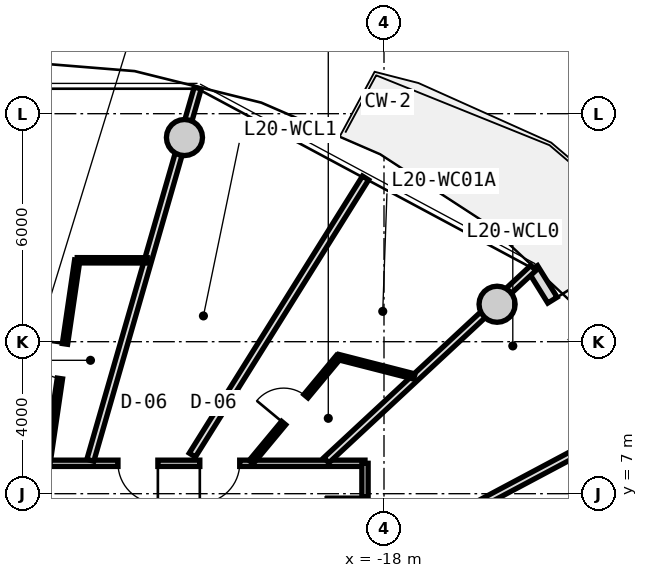
"""IFC4 building model, lengths in metres.
Left out: names, types, materials, properties, quantities, classifications, styles, units other than length and angle.
Written with IfcOpenShell. Run it as: python <this file> out.ifc"""

import sys

from ifc_helpers import new_model, si_unit, direction, frame, frame_2d, origin, origin_2d, place, context, subcontext, project, spatial, rectangle, circle, extrude, source, transform, mapped, element, fill, save


model = new_model("IFC4")
c1 = context("Model", 3, precision=1e-05, world=origin(), true_north=direction((0.0, 1.0)))
c2 = subcontext(c1, "Body", "Model", "MODEL_VIEW")
j1 = project(units=[si_unit("LENGTHUNIT", "METRE"), si_unit("PLANEANGLEUNIT", "RADIAN")], contexts=[c1])
p1 = place(None, origin())
s1 = spatial("IfcSite", under=j1, at=p1, CompositionType="ELEMENT")
p2 = place(p1, origin())
s2 = spatial("IfcBuilding", under=s1, at=p2, CompositionType="ELEMENT")
p3 = place(p2, frame((0.0, 0.0, 67.35)))
s3 = spatial("IfcBuildingStorey", under=s2, at=p3, CompositionType="ELEMENT", Elevation=67.35)
m1 = source(origin(), c2, "Body", "SweptSolid", [
    extrude(circle(Radius=0.475, at=origin_2d()), origin(), (0.0, 0.0, 1.0), 3.05),
])
for number, where, z_axis, x_axis in (
    (1, (-15.025, 11.985, 0.0), (0.0, 0.0, 1.0), (1.0, 0.0, 0.0)),
    (2, (-23.251, 16.373, 0.0), (0.0, 0.0, 1.0), (1.0, 0.0, 0.0)),
):
    element("IfcColumn", number, at=place(p3, frame(where, z_axis=z_axis, x_axis=x_axis)), inside=s3, PredefinedType="COLUMN", context=c2, shape_type="MappedRepresentation", body=[
        mapped(m1, transform((0.0, 0.0, 0.0), x_axis=(1.0, 0.0, 0.0), y_axis=(0.0, 1.0, 0.0), z_axis=(0.0, 0.0, 1.0), scale=1.0)),
    ])
m2 = source(origin(), c2, "Body", "SweptSolid", [
    extrude(rectangle(XDim=9.649, YDim=0.29, at=frame_2d((4.824, 0.0))), origin(), (0.0, 0.0, 1.0), 2.79),
])
p4 = place(p3, frame((-14.084, 12.926, 0.0), z_axis=(0.0, 0.0, 1.0), x_axis=(0.527909458386, -0.849300655684, 0.0)))
e3 = element("IfcWall", 3, at=p4, inside=s3, PredefinedType="SOLIDWALL", context=c2, shape_type="MappedRepresentation", body=[
    mapped(m2, transform((0.0, 0.0, 0.0), x_axis=(1.0, 0.0, 0.0), y_axis=(0.0, 1.0, 0.0), z_axis=(0.0, 0.0, 1.0), scale=1.0)),
])
p5 = place(p4, frame((0.98, 0.0, 0.0)))
e4 = element("IfcOpeningElement", 4, at=p5, cuts=e3, PredefinedType="OPENING", context=c2, shape_type="SweptSolid", body=[
    extrude(rectangle(XDim=1.15, YDim=2.25, at=frame_2d((0.575, 1.125))), frame((0.0, 0.155, 0.0), z_axis=(0.0, -1.0, 0.0), x_axis=(1.0, 0.0, 0.0)), (0.0, 0.0, 1.0), 0.31),
])
p6 = place(p4, frame((5.354, 0.0, 0.85)))
e5 = element("IfcOpeningElement", 5, at=p6, cuts=e3, PredefinedType="OPENING", context=c2, shape_type="SweptSolid", body=[
    extrude(rectangle(XDim=1.2, YDim=1.5, at=frame_2d((0.6, 0.75))), frame((0.0, 0.155, 0.0), z_axis=(0.0, -1.0, 0.0), x_axis=(1.0, 0.0, 0.0)), (0.0, 0.0, 1.0), 0.31),
])
m3 = source(origin(), c2, "Body", "SweptSolid", [
    extrude(rectangle(XDim=19.0, YDim=0.165, at=frame_2d((9.5, 0.0))), origin(), (0.0, 0.0, 1.0), 2.775),
])
p7 = place(p3, frame((-37.5, 7.8, 0.0), z_axis=(0.0, 0.0, 1.0), x_axis=(1.0, 0.0, 0.0)))
e6 = element("IfcWall", 6, at=p7, inside=s3, PredefinedType="PARTITIONING", context=c2, shape_type="MappedRepresentation", body=[
    mapped(m3, transform((0.0, 0.0, 0.0), x_axis=(1.0, 0.0, 0.0), y_axis=(0.0, 1.0, 0.0), z_axis=(0.0, 0.0, 1.0), scale=1.0)),
])
p8 = place(p7, frame((14.653, 0.0, 0.0)))
e7 = element("IfcOpeningElement", 7, at=p8, cuts=e6, PredefinedType="OPENING", context=c2, shape_type="SweptSolid", body=[
    extrude(rectangle(XDim=1.05, YDim=2.15, at=frame_2d((0.525, 1.075))), frame((0.0, 0.093, 0.0), z_axis=(0.0, -1.0, 0.0), x_axis=(1.0, 0.0, 0.0)), (0.0, 0.0, 1.0), 0.185),
])
p9 = place(p7, frame((12.5, 0.0, 0.0)))
e8 = element("IfcOpeningElement", 8, at=p9, cuts=e6, PredefinedType="OPENING", context=c2, shape_type="SweptSolid", body=[
    extrude(rectangle(XDim=1.05, YDim=2.15, at=frame_2d((0.525, 1.075))), frame((0.0, 0.093, 0.0), z_axis=(0.0, -1.0, 0.0), x_axis=(1.0, 0.0, 0.0)), (0.0, 0.0, 1.0), 0.185),
])
p10 = place(p7, frame((9.352, 0.0, 0.0)))
e9 = element("IfcOpeningElement", 9, at=p10, cuts=e6, PredefinedType="OPENING", context=c2, shape_type="SweptSolid", body=[
    extrude(rectangle(XDim=1.05, YDim=2.15, at=frame_2d((0.525, 1.075))), frame((0.0, 0.093, 0.0), z_axis=(0.0, -1.0, 0.0), x_axis=(1.0, 0.0, 0.0)), (0.0, 0.0, 1.0), 0.185),
])
p11 = place(p7, frame((7.806, 0.0, 0.0)))
e10 = element("IfcOpeningElement", 10, at=p11, cuts=e6, PredefinedType="OPENING", context=c2, shape_type="SweptSolid", body=[
    extrude(rectangle(XDim=1.05, YDim=2.15, at=frame_2d((0.525, 1.075))), frame((0.0, 0.093, 0.0), z_axis=(0.0, -1.0, 0.0), x_axis=(1.0, 0.0, 0.0)), (0.0, 0.0, 1.0), 0.185),
])
p12 = place(p7, frame((4.773, 0.0, 0.0)))
e11 = element("IfcOpeningElement", 11, at=p12, cuts=e6, PredefinedType="OPENING", context=c2, shape_type="SweptSolid", body=[
    extrude(rectangle(XDim=1.05, YDim=2.15, at=frame_2d((0.525, 1.075))), frame((0.0, 0.093, 0.0), z_axis=(0.0, -1.0, 0.0), x_axis=(1.0, 0.0, 0.0)), (0.0, 0.0, 1.0), 0.185),
])
p13 = place(p7, frame((2.251, 0.0, 0.0)))
e12 = element("IfcOpeningElement", 12, at=p13, cuts=e6, PredefinedType="OPENING", context=c2, shape_type="SweptSolid", body=[
    extrude(rectangle(XDim=1.05, YDim=2.15, at=frame_2d((0.525, 1.075))), frame((0.0, 0.093, 0.0), z_axis=(0.0, -1.0, 0.0), x_axis=(1.0, 0.0, 0.0)), (0.0, 0.0, 1.0), 0.185),
])
m4 = source(origin(), c2, "Body", "SweptSolid", [
    extrude(rectangle(XDim=15.6, YDim=0.165, at=frame_2d((7.8, 0.0))), origin(), (0.0, 0.0, 1.0), 2.775),
])
p14 = place(p3, frame((-18.5, 7.8, 0.0), z_axis=(0.0, 0.0, 1.0), x_axis=(0.0, -1.0, 0.0)))
e13 = element("IfcWall", 13, at=p14, inside=s3, PredefinedType="PARTITIONING", context=c2, shape_type="MappedRepresentation", body=[
    mapped(m4, transform((0.0, 0.0, 0.0), x_axis=(1.0, 0.0, 0.0), y_axis=(0.0, 1.0, 0.0), z_axis=(0.0, 0.0, 1.0), scale=1.0)),
])
p15 = place(p14, frame((12.141, 0.0, 0.0)))
e14 = element("IfcOpeningElement", 14, at=p15, cuts=e13, PredefinedType="OPENING", context=c2, shape_type="SweptSolid", body=[
    extrude(rectangle(XDim=1.25, YDim=2.2, at=frame_2d((0.625, 1.1))), frame((0.0, 0.093, 0.0), z_axis=(0.0, -1.0, 0.0), x_axis=(1.0, 0.0, 0.0)), (0.0, 0.0, 1.0), 0.185),
])
p16 = place(p14, frame((7.175, 0.0, 0.0)))
e15 = element("IfcOpeningElement", 15, at=p16, cuts=e13, PredefinedType="OPENING", context=c2, shape_type="SweptSolid", body=[
    extrude(rectangle(XDim=1.25, YDim=2.2, at=frame_2d((0.625, 1.1))), frame((0.0, 0.093, 0.0), z_axis=(0.0, -1.0, 0.0), x_axis=(1.0, 0.0, 0.0)), (0.0, 0.0, 1.0), 0.185),
])
p17 = place(p14, frame((2.826, 0.0, 0.0)))
e16 = element("IfcOpeningElement", 16, at=p17, cuts=e13, PredefinedType="OPENING", context=c2, shape_type="SweptSolid", body=[
    extrude(rectangle(XDim=1.05, YDim=2.15, at=frame_2d((0.525, 1.075))), frame((0.0, 0.093, 0.0), z_axis=(0.0, -1.0, 0.0), x_axis=(1.0, 0.0, 0.0)), (0.0, 0.0, 1.0), 0.185),
])
p18 = place(p14, frame((0.881, 0.0, 0.0)))
e17 = element("IfcOpeningElement", 17, at=p18, cuts=e13, PredefinedType="OPENING", context=c2, shape_type="SweptSolid", body=[
    extrude(rectangle(XDim=1.05, YDim=2.15, at=frame_2d((0.525, 1.075))), frame((0.0, 0.093, 0.0), z_axis=(0.0, -1.0, 0.0), x_axis=(1.0, 0.0, 0.0)), (0.0, 0.0, 1.0), 0.185),
])
m5 = source(origin(), c2, "Body", "SweptSolid", [
    extrude(rectangle(XDim=7.435, YDim=0.19, at=frame_2d((3.717, 0.0))), origin(), (0.0, 0.0, 1.0), 2.225),
])
p19 = place(p3, frame((-19.517, 7.88, 0.0), z_axis=(0.0, 0.0, 1.0), x_axis=(0.732651956848, 0.680603489652, 0.0)))
e18 = element("IfcWall", 18, at=p19, inside=s3, PredefinedType="PARTITIONING", context=c2, shape_type="MappedRepresentation", body=[
    mapped(m5, transform((0.0, 0.0, 0.0), x_axis=(1.0, 0.0, 0.0), y_axis=(0.0, 1.0, 0.0), z_axis=(0.0, 0.0, 1.0), scale=1.0)),
])
m6 = source(origin(), c2, "Body", "SweptSolid", [
    extrude(rectangle(XDim=7.677, YDim=0.19, at=frame_2d((3.838, 0.0))), origin(), (0.0, 0.0, 1.0), 2.775),
])
p20 = place(p3, frame((-18.297, 5.231, 0.0), z_axis=(0.0, 0.0, 1.0), x_axis=(0.882725057546, 0.469889851753, 0.0)))
e19 = element("IfcWall", 19, at=p20, inside=s3, PredefinedType="PARTITIONING", context=c2, shape_type="MappedRepresentation", body=[
    mapped(m6, transform((0.0, 0.0, 0.0), x_axis=(1.0, 0.0, 0.0), y_axis=(0.0, 1.0, 0.0), z_axis=(0.0, 0.0, 1.0), scale=1.0)),
])
m7 = source(origin(), c2, "Body", "SweptSolid", [
    extrude(rectangle(XDim=10.196, YDim=0.19, at=frame_2d((5.098, 0.0))), origin(), (0.0, 0.0, 1.0), 2.225),
])
p21 = place(p3, frame((-25.727, 7.88, 0.0), z_axis=(0.0, 0.0, 1.0), x_axis=(0.277136420347, 0.960830580549, 0.0)))
e20 = element("IfcWall", 20, at=p21, inside=s3, PredefinedType="PARTITIONING", context=c2, shape_type="MappedRepresentation", body=[
    mapped(m7, transform((0.0, 0.0, 0.0), x_axis=(1.0, 0.0, 0.0), y_axis=(0.0, 1.0, 0.0), z_axis=(0.0, 0.0, 1.0), scale=1.0)),
])
m8 = source(origin(), c2, "Body", "SweptSolid", [
    extrude(rectangle(XDim=8.598, YDim=0.19, at=frame_2d((4.299, 0.0))), origin(), (0.0, 0.0, 1.0), 2.775),
])
p22 = place(p3, frame((-23.043, 8.017, 0.0), z_axis=(0.0, 0.0, 1.0), x_axis=(0.530039776395, 0.847972779893, 0.0)))
e21 = element("IfcWall", 21, at=p22, inside=s3, PredefinedType="PARTITIONING", context=c2, shape_type="MappedRepresentation", body=[
    mapped(m8, transform((0.0, 0.0, 0.0), x_axis=(1.0, 0.0, 0.0), y_axis=(0.0, 1.0, 0.0), z_axis=(0.0, 0.0, 1.0), scale=1.0)),
])
m9 = source(origin(), c2, "Body", "SweptSolid", [
    extrude(rectangle(XDim=3.594, YDim=0.14, at=frame_2d((1.797, 0.0))), origin(), (0.0, 0.0, 1.0), 2.775),
])
p23 = place(p3, frame((-21.496, 7.83, 0.0), z_axis=(0.0, 0.0, 1.0), x_axis=(0.639001147083, 0.769205781326, 0.0)))
e22 = element("IfcWall", 22, at=p23, inside=s3, PredefinedType="PARTITIONING", context=c2, shape_type="MappedRepresentation", body=[
    mapped(m9, transform((0.0, 0.0, 0.0), x_axis=(1.0, 0.0, 0.0), y_axis=(0.0, 1.0, 0.0), z_axis=(0.0, 0.0, 1.0), scale=1.0)),
])
p24 = place(p23, frame((1.337, 0.0, 0.0)))
e23 = element("IfcOpeningElement", 23, at=p24, cuts=e22, PredefinedType="OPENING", context=c2, shape_type="SweptSolid", body=[
    extrude(rectangle(XDim=0.92, YDim=2.1, at=frame_2d((0.46, 1.05))), frame((0.0, 0.08, 0.0), z_axis=(0.0, -1.0, 0.0), x_axis=(1.0, 0.0, 0.0)), (0.0, 0.0, 1.0), 0.16),
])
m10 = source(origin(), c2, "Body", "SweptSolid", [
    extrude(rectangle(XDim=2.062, YDim=0.14, at=frame_2d((1.031, 0.0))), origin(), (0.0, 0.0, 1.0), 2.415),
])
p25 = place(p3, frame((-19.199, 10.595, 0.0), z_axis=(0.0, 0.0, 1.0), x_axis=(0.968776253543, -0.247936626121, 0.0)))
e24 = element("IfcWall", 24, at=p25, inside=s3, PredefinedType="PARTITIONING", context=c2, shape_type="MappedRepresentation", body=[
    mapped(m10, transform((0.0, 0.0, 0.0), x_axis=(1.0, 0.0, 0.0), y_axis=(0.0, 1.0, 0.0), z_axis=(0.0, 0.0, 1.0), scale=1.0)),
])
m11 = source(origin(), c2, "Body", "SweptSolid", [
    extrude(rectangle(XDim=5.37, YDim=0.14, at=frame_2d((2.685, 0.0))), origin(), (0.0, 0.0, 1.0), 2.775),
])
p26 = place(p3, frame((-26.851, 7.83, 0.0), z_axis=(0.0, 0.0, 1.0), x_axis=(0.145131397853, 0.989412389935, 0.0)))
e25 = element("IfcWall", 25, at=p26, inside=s3, PredefinedType="PARTITIONING", context=c2, shape_type="MappedRepresentation", body=[
    mapped(m11, transform((0.0, 0.0, 0.0), x_axis=(1.0, 0.0, 0.0), y_axis=(0.0, 1.0, 0.0), z_axis=(0.0, 0.0, 1.0), scale=1.0)),
])
p27 = place(p26, frame((2.225, 0.0, 0.0)))
e26 = element("IfcOpeningElement", 26, at=p27, cuts=e25, PredefinedType="OPENING", context=c2, shape_type="SweptSolid", body=[
    extrude(rectangle(XDim=0.92, YDim=2.1, at=frame_2d((0.46, 1.05))), frame((0.0, 0.08, 0.0), z_axis=(0.0, -1.0, 0.0), x_axis=(1.0, 0.0, 0.0)), (0.0, 0.0, 1.0), 0.16),
])
m12 = source(origin(), c2, "Body", "SweptSolid", [
    extrude(rectangle(XDim=1.843, YDim=0.14, at=frame_2d((0.921, 0.0))), origin(), (0.0, 0.0, 1.0), 2.775),
])
p28 = place(p3, frame((-26.072, 13.143, 0.0), z_axis=(0.0, 0.0, 1.0), x_axis=(0.999998937801, -0.001457531246, 0.0)))
e27 = element("IfcWall", 27, at=p28, inside=s3, PredefinedType="PARTITIONING", context=c2, shape_type="MappedRepresentation", body=[
    mapped(m12, transform((0.0, 0.0, 0.0), x_axis=(1.0, 0.0, 0.0), y_axis=(0.0, 1.0, 0.0), z_axis=(0.0, 0.0, 1.0), scale=1.0)),
])
m13 = source(origin(), c2, "Body", "SweptSolid", [
    extrude(rectangle(XDim=1.15, YDim=2.25, at=frame_2d((0.575, 1.125))), frame((0.0, 0.025, 0.0), z_axis=(0.0, -1.0, 0.0), x_axis=(1.0, 0.0, 0.0)), (0.0, 0.0, 1.0), 0.05),
])
p29 = place(p5, origin())
e28 = element("IfcDoor", 28, at=p29, inside=s3, OperationType="SINGLE_SWING_LEFT", PredefinedType="DOOR", context=c2, shape_type="MappedRepresentation", body=[
    mapped(m13, transform((0.0, 0.0, 0.0), x_axis=(1.0, 0.0, 0.0), y_axis=(0.0, 1.0, 0.0), z_axis=(0.0, 0.0, 1.0), scale=1.0)),
])
fill(e4, e28)
m14 = source(origin(), c2, "Body", "SweptSolid", [
    extrude(rectangle(XDim=1.05, YDim=2.15, at=frame_2d((0.525, 1.075))), frame((0.0, 0.025, 0.0), z_axis=(0.0, -1.0, 0.0), x_axis=(1.0, 0.0, 0.0)), (0.0, 0.0, 1.0), 0.05),
])
p30 = place(p18, frame((1.05, 0.0, 0.0), z_axis=(0.0, 0.0, 1.0), x_axis=(-1.0, 0.0, 0.0)))
e29 = element("IfcDoor", 29, at=p30, inside=s3, OperationType="SINGLE_SWING_RIGHT", PredefinedType="DOOR", context=c2, shape_type="MappedRepresentation", body=[
    mapped(m14, transform((0.0, 0.0, 0.0), x_axis=(1.0, 0.0, 0.0), y_axis=(0.0, 1.0, 0.0), z_axis=(0.0, 0.0, 1.0), scale=1.0)),
])
fill(e17, e29)
p31 = place(p8, frame((1.05, 0.0, 0.0), z_axis=(0.0, 0.0, 1.0), x_axis=(-1.0, 0.0, 0.0)))
e30 = element("IfcDoor", 30, at=p31, inside=s3, OperationType="SINGLE_SWING_RIGHT", PredefinedType="DOOR", context=c2, shape_type="MappedRepresentation", body=[
    mapped(m14, transform((0.0, 0.0, 0.0), x_axis=(1.0, 0.0, 0.0), y_axis=(0.0, 1.0, 0.0), z_axis=(0.0, 0.0, 1.0), scale=1.0)),
])
fill(e7, e30)
m15 = source(origin(), c2, "Body", "SweptSolid", [
    extrude(rectangle(XDim=0.92, YDim=2.1, at=frame_2d((0.46, 1.05))), frame((0.0, 0.025, 0.0), z_axis=(0.0, -1.0, 0.0), x_axis=(1.0, 0.0, 0.0)), (0.0, 0.0, 1.0), 0.05),
])
p32 = place(p24, origin())
e31 = element("IfcDoor", 31, at=p32, inside=s3, OperationType="SINGLE_SWING_LEFT", PredefinedType="DOOR", context=c2, shape_type="MappedRepresentation", body=[
    mapped(m15, transform((0.0, 0.0, 0.0), x_axis=(1.0, 0.0, 0.0), y_axis=(0.0, 1.0, 0.0), z_axis=(0.0, 0.0, 1.0), scale=1.0)),
])
fill(e23, e31)
p33 = place(p9, frame((1.05, 0.0, 0.0), z_axis=(0.0, 0.0, 1.0), x_axis=(-1.0, 0.0, 0.0)))
e32 = element("IfcDoor", 32, at=p33, inside=s3, OperationType="SINGLE_SWING_LEFT", PredefinedType="DOOR", context=c2, shape_type="MappedRepresentation", body=[
    mapped(m14, transform((0.0, 0.0, 0.0), x_axis=(1.0, 0.0, 0.0), y_axis=(0.0, 1.0, 0.0), z_axis=(0.0, 0.0, 1.0), scale=1.0)),
])
fill(e8, e32)
p34 = place(p27, origin())
e33 = element("IfcDoor", 33, at=p34, inside=s3, OperationType="SINGLE_SWING_RIGHT", PredefinedType="DOOR", context=c2, shape_type="MappedRepresentation", body=[
    mapped(m15, transform((0.0, 0.0, 0.0), x_axis=(1.0, 0.0, 0.0), y_axis=(0.0, 1.0, 0.0), z_axis=(0.0, 0.0, 1.0), scale=1.0)),
])
fill(e26, e33)
save(model, sys.argv[1])
